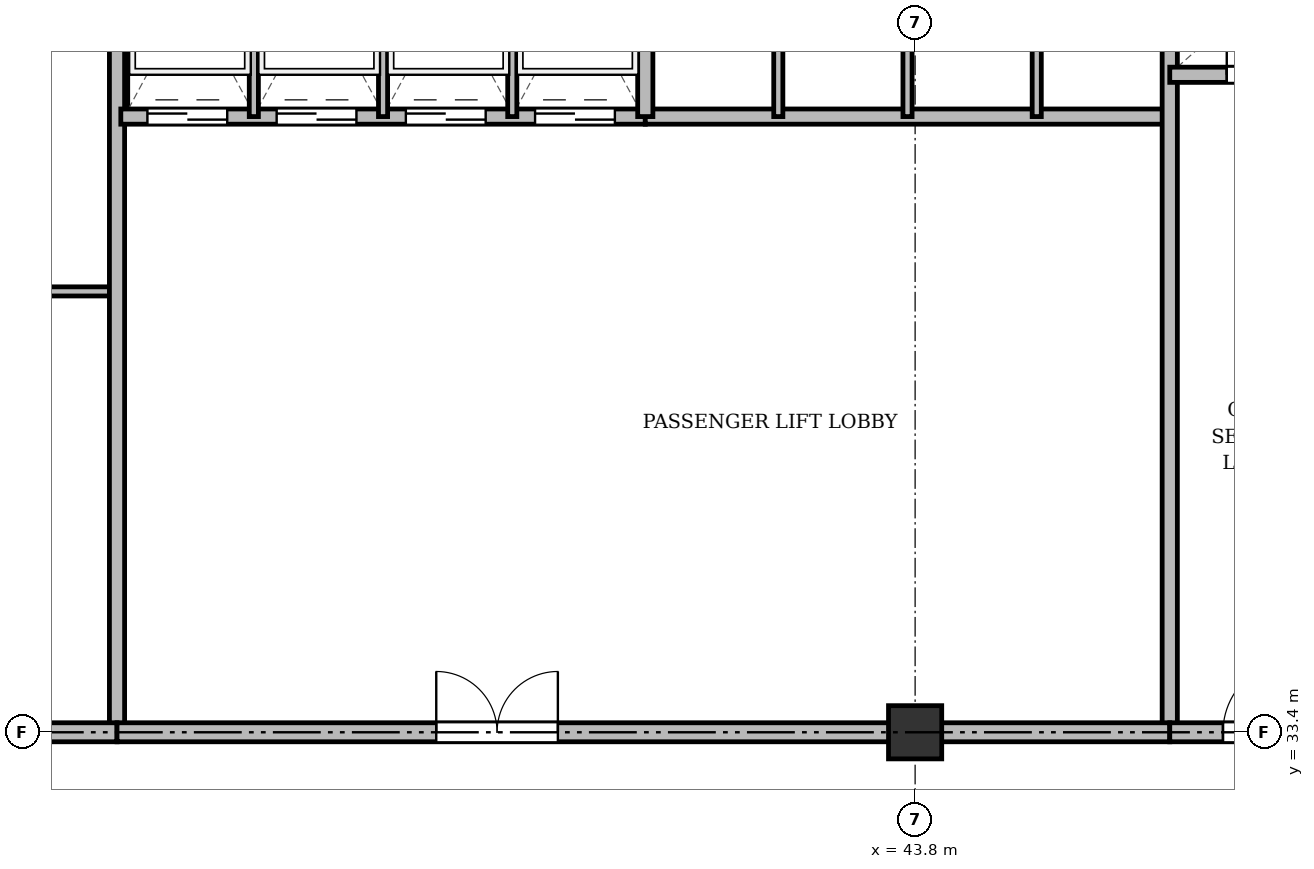
"""IFC4 building model, lengths in metres.
Left out: names, types, materials, properties, quantities, classifications, styles, units other than length and angle.
Written with IfcOpenShell. Run it as: python <this file> out.ifc"""

import sys

from ifc_helpers import new_model, si_unit, direction, frame, frame_2d, origin, origin_2d, place, context, subcontext, project, spatial, rectangle, extrude, source, transform, mapped, element, fill, save


model = new_model("IFC4")
c1 = context("Model", 3, precision=1e-05, world=origin(), true_north=direction((0.0, 1.0)))
c2 = subcontext(c1, "Body", "Model", "MODEL_VIEW")
j1 = project(units=[si_unit("LENGTHUNIT", "METRE"), si_unit("PLANEANGLEUNIT", "RADIAN")], contexts=[c1])
p1 = place(None, origin())
s1 = spatial("IfcSite", under=j1, at=p1, CompositionType="ELEMENT")
p2 = place(p1, origin())
s2 = spatial("IfcBuilding", under=s1, at=p2, CompositionType="ELEMENT")
p3 = place(p2, frame((0.0, 0.0, 160.9)))
s3 = spatial("IfcBuildingStorey", under=s2, at=p3, CompositionType="ELEMENT", Elevation=160.9)
m1 = source(origin(), c2, "Body", "SweptSolid", [
    extrude(rectangle(XDim=0.7, YDim=0.7, at=origin_2d()), origin(), (0.0, 0.0, 1.0), 3.6),
])
p4 = place(p3, frame((43.8, 33.4, 0.0), z_axis=(0.0, 0.0, 1.0), x_axis=(1.0, 0.0, 0.0)))
e1 = element("IfcColumn", 1, at=p4, inside=s3, PredefinedType="COLUMN", context=c2, shape_type="MappedRepresentation", body=[
    mapped(m1, transform((0.0, 0.0, 0.0), x_axis=(1.0, 0.0, 0.0), y_axis=(0.0, 1.0, 0.0), z_axis=(0.0, 0.0, 1.0), scale=1.0)),
])
p5 = place(p3, frame((26.3, 39.2, 0.0), z_axis=(0.0, 0.0, 1.0), x_axis=(1.0, 0.0, 0.0)))
e2 = element("IfcWall", 2, at=p5, inside=s3, PredefinedType="PARTITIONING", context=c2, shape_type="SweptSolid", body=[
    extrude(rectangle(XDim=7.0, YDim=0.12, at=frame_2d((3.5, 0.0))), origin(), (0.0, 0.0, 1.0), 2.85),
])
p6 = place(p5, frame((2.6, 0.0, 0.0)))
e3 = element("IfcOpeningElement", 3, at=p6, cuts=e2, PredefinedType="OPENING", context=c2, shape_type="SweptSolid", body=[
    extrude(rectangle(XDim=0.95, YDim=2.15, at=frame_2d((0.475, 1.075))), frame((0.0, 0.07, 0.0), z_axis=(0.0, -1.0, 0.0), x_axis=(1.0, 0.0, 0.0)), (0.0, 0.0, 1.0), 0.14),
])
p7 = place(p3, frame((33.3, 33.4, 0.0), z_axis=(0.0, 0.0, 1.0), x_axis=(0.0, 1.0, 0.0)))
e4 = element("IfcWall", 4, at=p7, inside=s3, PredefinedType="SOLIDWALL", context=c2, shape_type="SweptSolid", body=[
    extrude(rectangle(XDim=11.3, YDim=0.2, at=frame_2d((5.65, 0.0))), origin(), (0.0, 0.0, 1.0), 2.75),
])
p8 = place(p3, frame((33.35, 41.5, 0.0), z_axis=(0.0, 0.0, 1.0), x_axis=(1.0, 0.0, 0.0)))
e5 = element("IfcWall", 5, at=p8, inside=s3, PredefinedType="SOLIDWALL", context=c2, shape_type="SweptSolid", body=[
    extrude(rectangle(XDim=6.9, YDim=0.2, at=frame_2d((3.45, 0.0))), origin(), (0.0, 0.0, 1.0), 3.35),
])
p9 = place(p8, frame((0.35, 0.0, 0.0)))
e6 = element("IfcOpeningElement", 6, at=p9, cuts=e5, PredefinedType="OPENING", context=c2, shape_type="SweptSolid", body=[
    extrude(rectangle(XDim=1.05, YDim=2.15, at=frame_2d((0.525, 1.075))), frame((0.0, 0.11, 0.0), z_axis=(0.0, -1.0, 0.0), x_axis=(1.0, 0.0, 0.0)), (0.0, 0.0, 1.0), 0.22),
])
p10 = place(p8, frame((2.05, 0.0, 0.0)))
e7 = element("IfcOpeningElement", 7, at=p10, cuts=e5, PredefinedType="OPENING", context=c2, shape_type="SweptSolid", body=[
    extrude(rectangle(XDim=1.05, YDim=2.15, at=frame_2d((0.525, 1.075))), frame((0.0, 0.11, 0.0), z_axis=(0.0, -1.0, 0.0), x_axis=(1.0, 0.0, 0.0)), (0.0, 0.0, 1.0), 0.22),
])
p11 = place(p8, frame((3.75, 0.0, 0.0)))
e8 = element("IfcOpeningElement", 8, at=p11, cuts=e5, PredefinedType="OPENING", context=c2, shape_type="SweptSolid", body=[
    extrude(rectangle(XDim=1.05, YDim=2.15, at=frame_2d((0.525, 1.075))), frame((0.0, 0.11, 0.0), z_axis=(0.0, -1.0, 0.0), x_axis=(1.0, 0.0, 0.0)), (0.0, 0.0, 1.0), 0.22),
])
p12 = place(p8, frame((5.45, 0.0, 0.0)))
e9 = element("IfcOpeningElement", 9, at=p12, cuts=e5, PredefinedType="OPENING", context=c2, shape_type="SweptSolid", body=[
    extrude(rectangle(XDim=1.05, YDim=2.15, at=frame_2d((0.525, 1.075))), frame((0.0, 0.11, 0.0), z_axis=(0.0, -1.0, 0.0), x_axis=(1.0, 0.0, 0.0)), (0.0, 0.0, 1.0), 0.22),
])
for number, where, z_axis, x_axis in (
    (10, (35.1, 41.5, 0.0), (0.0, 0.0, 1.0), (0.0, 1.0, 0.0)),
    (11, (36.8, 41.5, 0.0), (0.0, 0.0, 1.0), (0.0, 1.0, 0.0)),
    (12, (38.5, 41.5, 0.0), (0.0, 0.0, 1.0), (0.0, 1.0, 0.0)),
):
    element("IfcWall", number, at=place(p3, frame(where, z_axis=z_axis, x_axis=x_axis)), inside=s3, PredefinedType="PARTITIONING", context=c2, shape_type="SweptSolid", body=[
        extrude(rectangle(XDim=3.2, YDim=0.12, at=frame_2d((1.6, 0.0))), origin(), (0.0, 0.0, 1.0), 3.35),
    ])
p13 = place(p3, frame((40.25, 41.5, 0.0), z_axis=(0.0, 0.0, 1.0), x_axis=(1.0, 0.0, 0.0)))
e13 = element("IfcWall", 13, at=p13, inside=s3, PredefinedType="SOLIDWALL", context=c2, shape_type="SweptSolid", body=[
    extrude(rectangle(XDim=6.9, YDim=0.2, at=frame_2d((3.45, 0.0))), origin(), (0.0, 0.0, 1.0), 2.85),
])
p14 = place(p3, frame((40.25, 41.5, 0.0), z_axis=(0.0, 0.0, 1.0), x_axis=(0.0, 1.0, 0.0)))
e14 = element("IfcWall", 14, at=p14, inside=s3, PredefinedType="SOLIDWALL", context=c2, shape_type="SweptSolid", body=[
    extrude(rectangle(XDim=3.2, YDim=0.2, at=frame_2d((1.6, 0.0))), origin(), (0.0, 0.0, 1.0), 3.35),
])
p15 = place(p3, frame((42.0, 41.5, 0.0), z_axis=(0.0, 0.0, 1.0), x_axis=(0.0, 1.0, 0.0)))
e15 = element("IfcWall", 15, at=p15, inside=s3, PredefinedType="PARTITIONING", context=c2, shape_type="SweptSolid", body=[
    extrude(rectangle(XDim=3.2, YDim=0.12, at=frame_2d((1.6, 0.0))), origin(), (0.0, 0.0, 1.0), 3.35),
])
p16 = place(p3, frame((43.7, 41.5, 0.0), z_axis=(0.0, 0.0, 1.0), x_axis=(0.0, 1.0, 0.0)))
e16 = element("IfcWall", 16, at=p16, inside=s3, PredefinedType="PARTITIONING", context=c2, shape_type="SweptSolid", body=[
    extrude(rectangle(XDim=3.2, YDim=0.12, at=frame_2d((1.6, 0.0))), origin(), (0.0, 0.0, 1.0), 2.85),
])
p17 = place(p3, frame((45.4, 41.5, 0.0), z_axis=(0.0, 0.0, 1.0), x_axis=(0.0, 1.0, 0.0)))
e17 = element("IfcWall", 17, at=p17, inside=s3, PredefinedType="PARTITIONING", context=c2, shape_type="SweptSolid", body=[
    extrude(rectangle(XDim=3.2, YDim=0.12, at=frame_2d((1.6, 0.0))), origin(), (0.0, 0.0, 1.0), 3.35),
])
p18 = place(p3, frame((47.15, 33.4, 0.0), z_axis=(0.0, 0.0, 1.0), x_axis=(0.0, 1.0, 0.0)))
e18 = element("IfcWall", 18, at=p18, inside=s3, PredefinedType="SOLIDWALL", context=c2, shape_type="SweptSolid", body=[
    extrude(rectangle(XDim=11.3, YDim=0.2, at=frame_2d((5.65, 0.0))), origin(), (0.0, 0.0, 1.0), 2.75),
])
p19 = place(p3, frame((26.3, 33.4, 0.0), z_axis=(0.0, 0.0, 1.0), x_axis=(1.0, 0.0, 0.0)))
e19 = element("IfcWall", 19, at=p19, inside=s3, PredefinedType="PARTITIONING", context=c2, shape_type="SweptSolid", body=[
    extrude(rectangle(XDim=7.0, YDim=0.25, at=frame_2d((3.5, 0.0))), origin(), (0.0, 0.0, 1.0), 2.75),
])
p20 = place(p19, frame((1.35, 0.0, 0.0)))
e20 = element("IfcOpeningElement", 20, at=p20, cuts=e19, PredefinedType="OPENING", context=c2, shape_type="SweptSolid", body=[
    extrude(rectangle(XDim=0.95, YDim=2.15, at=frame_2d((0.475, 1.075))), frame((0.0, 0.135, 0.0), z_axis=(0.0, -1.0, 0.0), x_axis=(1.0, 0.0, 0.0)), (0.0, 0.0, 1.0), 0.27),
])
p21 = place(p3, frame((33.3, 33.4, 0.0), z_axis=(0.0, 0.0, 1.0), x_axis=(1.0, 0.0, 0.0)))
e21 = element("IfcWall", 21, at=p21, inside=s3, PredefinedType="PARTITIONING", context=c2, shape_type="SweptSolid", body=[
    extrude(rectangle(XDim=13.85, YDim=0.25, at=frame_2d((6.925, 0.0))), origin(), (0.0, 0.0, 1.0), 2.75),
])
p22 = place(p21, frame((4.2, 0.0, 0.0)))
e22 = element("IfcOpeningElement", 22, at=p22, cuts=e21, PredefinedType="OPENING", context=c2, shape_type="SweptSolid", body=[
    extrude(rectangle(XDim=1.6, YDim=2.2, at=frame_2d((0.8, 1.1))), frame((0.0, 0.135, 0.0), z_axis=(0.0, -1.0, 0.0), x_axis=(1.0, 0.0, 0.0)), (0.0, 0.0, 1.0), 0.27),
])
p23 = place(p3, frame((47.15, 42.05, 0.0), z_axis=(0.0, 0.0, 1.0), x_axis=(1.0, 0.0, 0.0)))
e23 = element("IfcWall", 23, at=p23, inside=s3, PredefinedType="SOLIDWALL", context=c2, shape_type="SweptSolid", body=[
    extrude(rectangle(XDim=7.85, YDim=0.2, at=frame_2d((3.925, 0.0))), origin(), (0.0, 0.0, 1.0), 2.85),
])
p24 = place(p23, frame((0.75, 0.0, 0.0)))
e24 = element("IfcOpeningElement", 24, at=p24, cuts=e23, PredefinedType="OPENING", context=c2, shape_type="SweptSolid", body=[
    extrude(rectangle(XDim=0.9, YDim=2.1, at=frame_2d((0.45, 1.05))), frame((0.0, 0.11, 0.0), z_axis=(0.0, -1.0, 0.0), x_axis=(1.0, 0.0, 0.0)), (0.0, 0.0, 1.0), 0.22),
])
p25 = place(p23, frame((3.85, 0.0, 0.0)))
e25 = element("IfcOpeningElement", 25, at=p25, cuts=e23, PredefinedType="OPENING", context=c2, shape_type="SweptSolid", body=[
    extrude(rectangle(XDim=0.9, YDim=2.1, at=frame_2d((0.45, 1.05))), frame((0.0, 0.11, 0.0), z_axis=(0.0, -1.0, 0.0), x_axis=(1.0, 0.0, 0.0)), (0.0, 0.0, 1.0), 0.22),
])
p26 = place(p3, frame((47.15, 33.4, 0.0), z_axis=(0.0, 0.0, 1.0), x_axis=(1.0, 0.0, 0.0)))
e26 = element("IfcWall", 26, at=p26, inside=s3, PredefinedType="PARTITIONING", context=c2, shape_type="SweptSolid", body=[
    extrude(rectangle(XDim=11.15, YDim=0.25, at=frame_2d((5.575, 0.0))), origin(), (0.0, 0.0, 1.0), 2.75),
])
p27 = place(p26, frame((0.7, 0.0, 0.0)))
e27 = element("IfcOpeningElement", 27, at=p27, cuts=e26, PredefinedType="OPENING", context=c2, shape_type="SweptSolid", body=[
    extrude(rectangle(XDim=0.95, YDim=2.15, at=frame_2d((0.475, 1.075))), frame((0.0, 0.135, 0.0), z_axis=(0.0, -1.0, 0.0), x_axis=(1.0, 0.0, 0.0)), (0.0, 0.0, 1.0), 0.27),
])
p28 = place(p26, frame((6.0, 0.0, 0.0)))
e28 = element("IfcOpeningElement", 28, at=p28, cuts=e26, PredefinedType="OPENING", context=c2, shape_type="SweptSolid", body=[
    extrude(rectangle(XDim=1.2, YDim=2.15, at=frame_2d((0.6, 1.075))), frame((0.0, 0.135, 0.0), z_axis=(0.0, -1.0, 0.0), x_axis=(1.0, 0.0, 0.0)), (0.0, 0.0, 1.0), 0.27),
])
m2 = source(origin(), c2, "Body", "SweptSolid", [
    extrude(rectangle(XDim=1.05, YDim=2.15, at=frame_2d((0.525, 1.075))), frame((0.0, 0.025, 0.0), z_axis=(0.0, -1.0, 0.0), x_axis=(1.0, 0.0, 0.0)), (0.0, 0.0, 1.0), 0.05),
])
p29 = place(p9, origin())
e29 = element("IfcDoor", 29, at=p29, inside=s3, OperationType="DOUBLE_DOOR_SLIDING", PredefinedType="DOOR", context=c2, shape_type="MappedRepresentation", body=[
    mapped(m2, transform((0.0, 0.0, 0.0), x_axis=(1.0, 0.0, 0.0), y_axis=(0.0, 1.0, 0.0), z_axis=(0.0, 0.0, 1.0), scale=1.0)),
])
fill(e6, e29)
p30 = place(p10, origin())
e30 = element("IfcDoor", 30, at=p30, inside=s3, OperationType="DOUBLE_DOOR_SLIDING", PredefinedType="DOOR", context=c2, shape_type="MappedRepresentation", body=[
    mapped(m2, transform((0.0, 0.0, 0.0), x_axis=(1.0, 0.0, 0.0), y_axis=(0.0, 1.0, 0.0), z_axis=(0.0, 0.0, 1.0), scale=1.0)),
])
fill(e7, e30)
p31 = place(p11, origin())
e31 = element("IfcDoor", 31, at=p31, inside=s3, OperationType="DOUBLE_DOOR_SLIDING", PredefinedType="DOOR", context=c2, shape_type="MappedRepresentation", body=[
    mapped(m2, transform((0.0, 0.0, 0.0), x_axis=(1.0, 0.0, 0.0), y_axis=(0.0, 1.0, 0.0), z_axis=(0.0, 0.0, 1.0), scale=1.0)),
])
fill(e8, e31)
p32 = place(p12, origin())
e32 = element("IfcDoor", 32, at=p32, inside=s3, OperationType="DOUBLE_DOOR_SLIDING", PredefinedType="DOOR", context=c2, shape_type="MappedRepresentation", body=[
    mapped(m2, transform((0.0, 0.0, 0.0), x_axis=(1.0, 0.0, 0.0), y_axis=(0.0, 1.0, 0.0), z_axis=(0.0, 0.0, 1.0), scale=1.0)),
])
fill(e9, e32)
m3 = source(origin(), c2, "Body", "SweptSolid", [
    extrude(rectangle(XDim=1.6, YDim=2.2, at=frame_2d((0.8, 1.1))), frame((0.0, 0.025, 0.0), z_axis=(0.0, -1.0, 0.0), x_axis=(1.0, 0.0, 0.0)), (0.0, 0.0, 1.0), 0.05),
])
p33 = place(p22, origin())
e33 = element("IfcDoor", 33, at=p33, inside=s3, OperationType="DOUBLE_DOOR_SINGLE_SWING", PredefinedType="DOOR", context=c2, shape_type="MappedRepresentation", body=[
    mapped(m3, transform((0.0, 0.0, 0.0), x_axis=(1.0, 0.0, 0.0), y_axis=(0.0, 1.0, 0.0), z_axis=(0.0, 0.0, 1.0), scale=1.0)),
])
fill(e22, e33)
m4 = source(origin(), c2, "Body", "SweptSolid", [
    extrude(rectangle(XDim=0.9, YDim=2.1, at=frame_2d((0.45, 1.05))), frame((0.0, 0.025, 0.0), z_axis=(0.0, -1.0, 0.0), x_axis=(1.0, 0.0, 0.0)), (0.0, 0.0, 1.0), 0.05),
])
p34 = place(p24, origin())
e34 = element("IfcDoor", 34, at=p34, inside=s3, OperationType="SINGLE_SWING_LEFT", PredefinedType="DOOR", context=c2, shape_type="MappedRepresentation", body=[
    mapped(m4, transform((0.0, 0.0, 0.0), x_axis=(1.0, 0.0, 0.0), y_axis=(0.0, 1.0, 0.0), z_axis=(0.0, 0.0, 1.0), scale=1.0)),
])
fill(e24, e34)
m5 = source(origin(), c2, "Body", "SweptSolid", [
    extrude(rectangle(XDim=0.95, YDim=2.15, at=frame_2d((0.475, 1.075))), frame((0.0, 0.025, 0.0), z_axis=(0.0, -1.0, 0.0), x_axis=(1.0, 0.0, 0.0)), (0.0, 0.0, 1.0), 0.05),
])
p35 = place(p27, origin())
e35 = element("IfcDoor", 35, at=p35, inside=s3, OperationType="SINGLE_SWING_RIGHT", PredefinedType="DOOR", context=c2, shape_type="MappedRepresentation", body=[
    mapped(m5, transform((0.0, 0.0, 0.0), x_axis=(1.0, 0.0, 0.0), y_axis=(0.0, 1.0, 0.0), z_axis=(0.0, 0.0, 1.0), scale=1.0)),
])
fill(e27, e35)
save(model, sys.argv[1])
